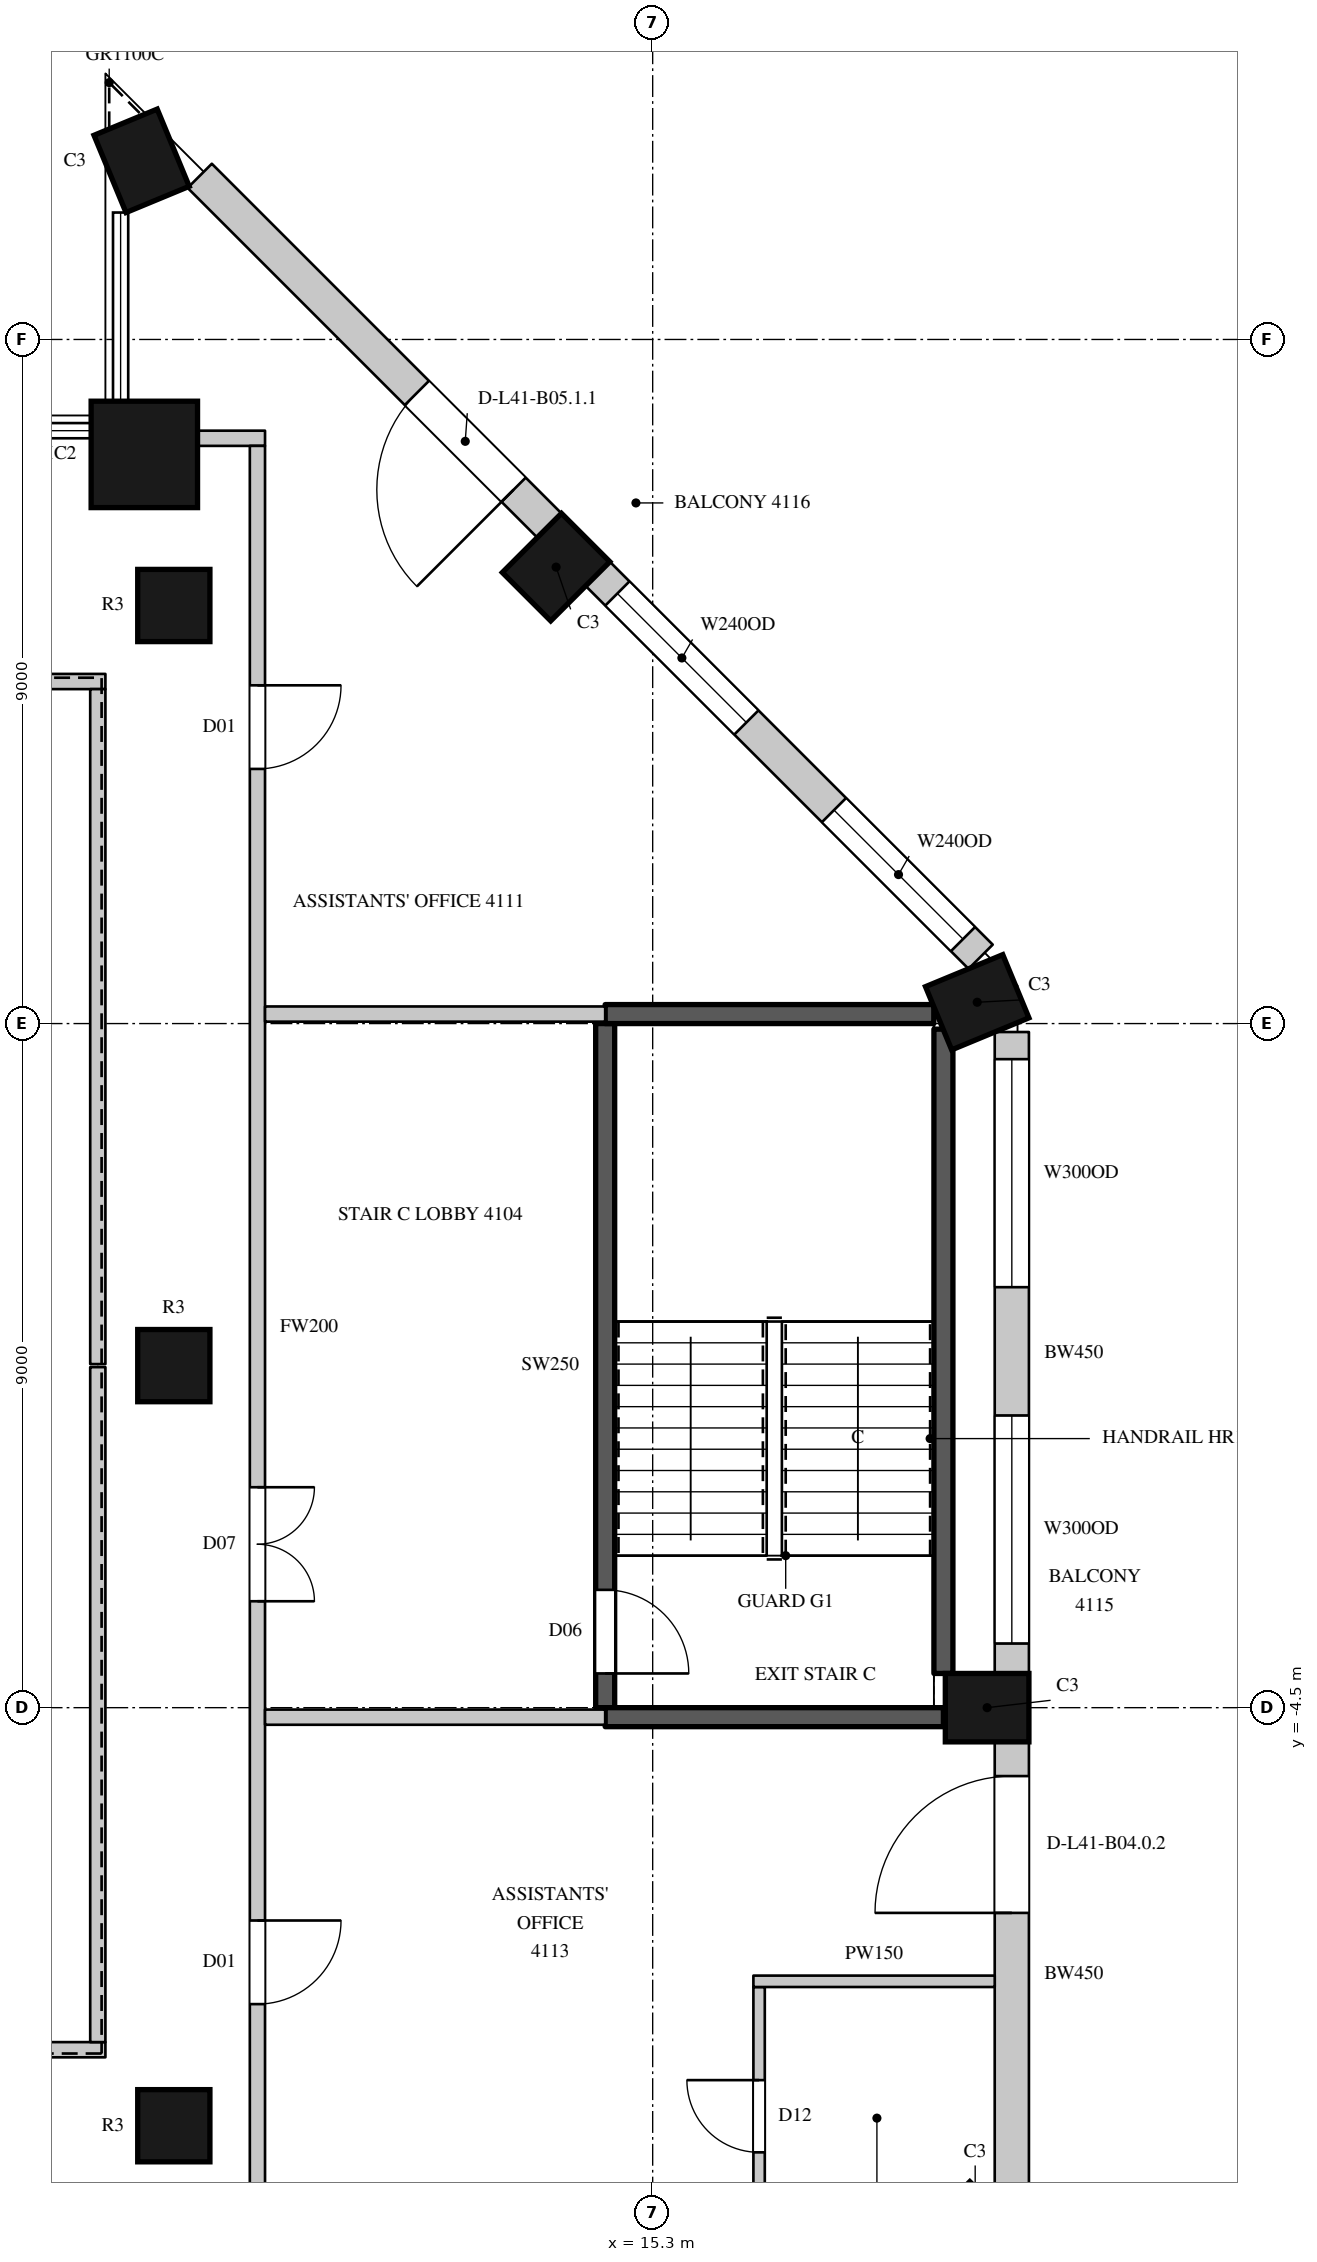
"""IFC4 building model, lengths in metres.
Left out: names, types, materials, properties, quantities, classifications, styles, units other than length and angle.
Written with IfcOpenShell. Run it as: python <this file> out.ifc"""

import sys

from ifc_helpers import new_model, si_unit, direction, frame, frame_2d, origin, origin_2d, place, context, subcontext, project, spatial, rectangle, circle, extrude, element, fill, save


model = new_model("IFC4")
c1 = context("Model", 3, precision=1e-05, world=origin(), true_north=direction((0.0, 1.0)))
c2 = subcontext(c1, "Body", "Model", "MODEL_VIEW")
j1 = project(units=[si_unit("LENGTHUNIT", "METRE"), si_unit("PLANEANGLEUNIT", "RADIAN")], contexts=[c1])
p1 = place(None, origin())
s1 = spatial("IfcSite", under=j1, at=p1, CompositionType="ELEMENT")
p2 = place(p1, origin())
s2 = spatial("IfcBuilding", under=s1, at=p2, CompositionType="ELEMENT")
p3 = place(p2, frame((0.0, 0.0, 189.2)))
s3 = spatial("IfcBuildingStorey", under=s2, at=p3, CompositionType="ELEMENT", Elevation=189.2)
for number, where, z_axis, x_axis in (
    (1, (19.543, -11.443, 0.0), (0.0, 0.0, 1.0), (0.707, 0.707, 0.0)),
    (2, (19.7, -4.5, 0.0), (0.0, 0.0, 1.0), (0.0, 1.0, 0.0)),
    (3, (19.57, 4.78, 0.0), (0.0, 0.0, 1.0), (-0.383, 0.924, 0.0)),
    (4, (14.029, 10.505, 0.0), (0.0, 0.0, 1.0), (-0.707, 0.707, 0.0)),
    (5, (8.576, 15.85, 0.0), (0.0, 0.0, 1.0), (-0.924, -0.383, 0.0)),
):
    element("IfcColumn", number, at=place(p3, frame(where, z_axis=z_axis, x_axis=x_axis)), inside=s3, PredefinedType="COLUMN", context=c2, shape_type="SweptSolid", body=[
        extrude(rectangle(XDim=0.9, YDim=1.1, at=origin_2d()), origin(), (0.0, 0.0, 1.0), 4.1),
    ])
p4 = place(p3, frame((8.612, 11.988, 0.0), z_axis=(0.0, 0.0, 1.0), x_axis=(1.0, 0.0, 0.0)))
e6 = element("IfcColumn", 6, at=p4, inside=s3, PredefinedType="COLUMN", context=c2, shape_type="SweptSolid", body=[
    extrude(circle(Radius=0.7, at=origin_2d()), origin(), (0.0, 0.0, 1.0), 4.1),
])
for number, where, z_axis, x_axis in (
    (7, (9.0, -10.0, 0.0), (0.0, 0.0, 1.0), (1.0, 0.0, 0.0)),
    (8, (9.0, 0.0, 0.0), (0.0, 0.0, 1.0), (1.0, 0.0, 0.0)),
    (9, (9.0, 10.0, 0.0), (0.0, 0.0, 1.0), (1.0, 0.0, 0.0)),
):
    element("IfcColumn", number, at=place(p3, frame(where, z_axis=z_axis, x_axis=x_axis)), inside=s3, PredefinedType="COLUMN", context=c2, shape_type="SweptSolid", body=[
        extrude(circle(Radius=0.475, at=origin_2d()), origin(), (0.0, 0.0, 1.0), 4.1),
    ])
p5 = place(p3, frame((20.025, -11.064, 0.0), z_axis=(0.0, 0.0, 1.0), x_axis=(0.0, 1.0, 0.0)))
e10 = element("IfcWall", 10, at=p5, inside=s3, PredefinedType="SOLIDWALL", context=c2, shape_type="SweptSolid", body=[
    extrude(rectangle(XDim=6.114, YDim=0.45, at=frame_2d((3.057, 0.0))), origin(), (0.0, 0.0, 1.0), 3.8),
])
p6 = place(p5, frame((3.864, 0.0, 0.0)))
e11 = element("IfcOpeningElement", 11, at=p6, cuts=e10, PredefinedType="OPENING", context=c2, shape_type="SweptSolid", body=[
    extrude(rectangle(XDim=1.8, YDim=2.4, at=frame_2d((0.9, 1.2))), frame((0.0, 0.235, 0.0), z_axis=(0.0, -1.0, 0.0), x_axis=(1.0, 0.0, 0.0)), (0.0, 0.0, 1.0), 0.47),
])
p7 = place(p3, frame((20.025, -4.05, 0.0), z_axis=(0.0, 0.0, 1.0), x_axis=(0.0, 1.0, 0.0)))
e12 = element("IfcWall", 12, at=p7, inside=s3, PredefinedType="SOLIDWALL", context=c2, shape_type="SweptSolid", body=[
    extrude(rectangle(XDim=8.439, YDim=0.45, at=frame_2d((4.219, 0.0))), origin(), (0.0, 0.0, 1.0), 3.8),
])
p8 = place(p7, frame((0.394, 0.0, 1.05)))
e13 = element("IfcOpeningElement", 13, at=p8, cuts=e12, PredefinedType="OPENING", context=c2, shape_type="SweptSolid", body=[
    extrude(rectangle(XDim=3.0, YDim=2.4, at=frame_2d((1.5, 1.2))), frame((0.0, 0.235, 0.0), z_axis=(0.0, -1.0, 0.0), x_axis=(1.0, 0.0, 0.0)), (0.0, 0.0, 1.0), 0.47),
])
p9 = place(p7, frame((5.082, 0.0, 1.05)))
e14 = element("IfcOpeningElement", 14, at=p9, cuts=e12, PredefinedType="OPENING", context=c2, shape_type="SweptSolid", body=[
    extrude(rectangle(XDim=3.0, YDim=2.4, at=frame_2d((1.5, 1.2))), frame((0.0, 0.235, 0.0), z_axis=(0.0, -1.0, 0.0), x_axis=(1.0, 0.0, 0.0)), (0.0, 0.0, 1.0), 0.47),
])
p10 = place(p3, frame((19.615, 5.379, 0.0), z_axis=(0.0, 0.0, 1.0), x_axis=(-0.707089646058, 0.7071239159, 0.0)))
e15 = element("IfcWall", 15, at=p10, inside=s3, PredefinedType="SOLIDWALL", context=c2, shape_type="SweptSolid", body=[
    extrude(rectangle(XDim=7.124, YDim=0.45, at=frame_2d((3.562, 0.0))), origin(), (0.0, 0.0, 1.0), 3.8),
])
p11 = place(p10, frame((0.328, 0.0, 1.05)))
e16 = element("IfcOpeningElement", 16, at=p11, cuts=e15, PredefinedType="OPENING", context=c2, shape_type="SweptSolid", body=[
    extrude(rectangle(XDim=2.4, YDim=2.4, at=frame_2d((1.2, 1.2))), frame((0.0, 0.235, 0.0), z_axis=(0.0, -1.0, 0.0), x_axis=(1.0, 0.0, 0.0)), (0.0, 0.0, 1.0), 0.47),
])
p12 = place(p10, frame((4.359, 0.0, 1.05)))
e17 = element("IfcOpeningElement", 17, at=p12, cuts=e15, PredefinedType="OPENING", context=c2, shape_type="SweptSolid", body=[
    extrude(rectangle(XDim=2.4, YDim=2.4, at=frame_2d((1.2, 1.2))), frame((0.0, 0.235, 0.0), z_axis=(0.0, -1.0, 0.0), x_axis=(1.0, 0.0, 0.0)), (0.0, 0.0, 1.0), 0.47),
])
p13 = place(p3, frame((13.941, 11.053, 0.0), z_axis=(0.0, 0.0, 1.0), x_axis=(-0.707106781187, 0.707106781187, 0.0)))
e18 = element("IfcWall", 18, at=p13, inside=s3, PredefinedType="SOLIDWALL", context=c2, shape_type="SweptSolid", body=[
    extrude(rectangle(XDim=6.505, YDim=0.45, at=frame_2d((3.252, 0.0))), origin(), (0.0, 0.0, 1.0), 3.8),
])
p14 = place(p13, frame((0.665, 0.0, 0.0)))
e19 = element("IfcOpeningElement", 19, at=p14, cuts=e18, PredefinedType="OPENING", context=c2, shape_type="SweptSolid", body=[
    extrude(rectangle(XDim=1.8, YDim=2.4, at=frame_2d((0.9, 1.2))), frame((0.0, 0.235, 0.0), z_axis=(0.0, -1.0, 0.0), x_axis=(1.0, 0.0, 0.0)), (0.0, 0.0, 1.0), 0.47),
])
for number, where, z_axis, x_axis in (
    (20, (-6.1, -9.0, 0.0), (0.0, 0.0, 1.0), (1.0, 0.0, 0.0)),
    (21, (-6.1, 9.0, 0.0), (0.0, 0.0, 1.0), (1.0, 0.0, 0.0)),
):
    element("IfcWall", number, at=place(p3, frame(where, z_axis=z_axis, x_axis=x_axis)), inside=s3, PredefinedType="PARTITIONING", context=c2, shape_type="SweptSolid", body=[
        extrude(rectangle(XDim=14.2, YDim=0.2, at=frame_2d((7.1, 0.0))), origin(), (0.0, 0.0, 1.0), 3.8),
    ])
for number, where, z_axis, x_axis in (
    (22, (8.0, -8.9, 0.0), (0.0, 0.0, 1.0), (0.0, 1.0, 0.0)),
    (23, (8.0, 0.02, 0.0), (0.0, 0.0, 1.0), (0.0, 1.0, 0.0)),
):
    element("IfcWall", number, at=place(p3, frame(where, z_axis=z_axis, x_axis=x_axis)), inside=s3, PredefinedType="PARTITIONING", context=c2, shape_type="SweptSolid", body=[
        extrude(rectangle(XDim=8.88, YDim=0.2, at=frame_2d((4.44, 0.0))), origin(), (0.0, 0.0, 1.0), 3.8),
    ])
p15 = place(p3, frame((9.296, 12.2, 0.0), z_axis=(0.0, 0.0, 1.0), x_axis=(1.0, 0.0, 0.0)))
e24 = element("IfcWall", 24, at=p15, inside=s3, PredefinedType="PARTITIONING", context=c2, shape_type="SweptSolid", body=[
    extrude(rectangle(XDim=0.904, YDim=0.2, at=frame_2d((0.452, 0.0))), origin(), (0.0, 0.0, 1.0), 3.8),
])
p16 = place(p3, frame((10.1, -11.1, 0.0), z_axis=(0.0, 0.0, 1.0), x_axis=(0.0, 1.0, 0.0)))
e25 = element("IfcWall", 25, at=p16, inside=s3, PredefinedType="PARTITIONING", context=c2, shape_type="SweptSolid", body=[
    extrude(rectangle(XDim=23.2, YDim=0.2, at=frame_2d((11.6, 0.0))), origin(), (0.0, 0.0, 1.0), 3.8),
])
p17 = place(p16, frame((8.0, 0.0, 0.0)))
e26 = element("IfcOpeningElement", 26, at=p17, cuts=e25, PredefinedType="OPENING", context=c2, shape_type="SweptSolid", body=[
    extrude(rectangle(XDim=1.5, YDim=2.4, at=frame_2d((0.75, 1.2))), frame((0.0, 0.11, 0.0), z_axis=(0.0, -1.0, 0.0), x_axis=(1.0, 0.0, 0.0)), (0.0, 0.0, 1.0), 0.22),
])
p18 = place(p16, frame((18.95, 0.0, 0.0)))
e27 = element("IfcOpeningElement", 27, at=p18, cuts=e25, PredefinedType="OPENING", context=c2, shape_type="SweptSolid", body=[
    extrude(rectangle(XDim=1.1, YDim=2.4, at=frame_2d((0.55, 1.2))), frame((0.0, 0.11, 0.0), z_axis=(0.0, -1.0, 0.0), x_axis=(1.0, 0.0, 0.0)), (0.0, 0.0, 1.0), 0.22),
])
p19 = place(p16, frame((2.7, 0.0, 0.0)))
e28 = element("IfcOpeningElement", 28, at=p19, cuts=e25, PredefinedType="OPENING", context=c2, shape_type="SweptSolid", body=[
    extrude(rectangle(XDim=1.1, YDim=2.4, at=frame_2d((0.55, 1.2))), frame((0.0, 0.11, 0.0), z_axis=(0.0, -1.0, 0.0), x_axis=(1.0, 0.0, 0.0)), (0.0, 0.0, 1.0), 0.22),
])
for number, where, z_axis, x_axis in (
    (29, (10.2, -4.625, 0.0), (0.0, 0.0, 1.0), (1.0, 0.0, 0.0)),
    (30, (10.2, 4.625, 0.0), (0.0, 0.0, 1.0), (1.0, 0.0, 0.0)),
):
    element("IfcWall", number, at=place(p3, frame(where, z_axis=z_axis, x_axis=x_axis)), inside=s3, PredefinedType="PARTITIONING", context=c2, shape_type="SweptSolid", body=[
        extrude(rectangle(XDim=4.475, YDim=0.2, at=frame_2d((2.238, 0.0))), origin(), (0.0, 0.0, 1.0), 3.8),
    ])
p20 = place(p3, frame((16.7, -11.7, 0.0), z_axis=(0.0, 0.0, 1.0), x_axis=(0.0, 1.0, 0.0)))
e31 = element("IfcWall", 31, at=p20, inside=s3, PredefinedType="PARTITIONING", context=c2, shape_type="SweptSolid", body=[
    extrude(rectangle(XDim=3.525, YDim=0.15, at=frame_2d((1.762, 0.0))), origin(), (0.0, 0.0, 1.0), 3.8),
])
p21 = place(p20, frame((1.35, 0.0, 0.0)))
e32 = element("IfcOpeningElement", 32, at=p21, cuts=e31, PredefinedType="OPENING", context=c2, shape_type="SweptSolid", body=[
    extrude(rectangle(XDim=0.95, YDim=2.2, at=frame_2d((0.475, 1.1))), frame((0.0, 0.085, 0.0), z_axis=(0.0, -1.0, 0.0), x_axis=(1.0, 0.0, 0.0)), (0.0, 0.0, 1.0), 0.17),
])
p22 = place(p3, frame((16.625, -8.1, 0.0), z_axis=(0.0, 0.0, 1.0), x_axis=(1.0, 0.0, 0.0)))
e33 = element("IfcWall", 33, at=p22, inside=s3, PredefinedType="PARTITIONING", context=c2, shape_type="SweptSolid", body=[
    extrude(rectangle(XDim=3.175, YDim=0.15, at=frame_2d((1.587, 0.0))), origin(), (0.0, 0.0, 1.0), 3.15),
])
p23 = place(p3, frame((14.675, -4.5, 0.0), z_axis=(0.0, 0.0, 1.0), x_axis=(0.0, 1.0, 0.0)))
e34 = element("IfcWall", 34, at=p23, inside=s3, PredefinedType="SHEAR", context=c2, shape_type="SweptSolid", body=[
    extrude(rectangle(XDim=9.0, YDim=0.25, at=frame_2d((4.5, 0.0))), origin(), (0.0, 0.0, 1.0), 3.8),
])
p24 = place(p23, frame((0.45, 0.0, 0.0)))
e35 = element("IfcOpeningElement", 35, at=p24, cuts=e34, PredefinedType="OPENING", context=c2, shape_type="SweptSolid", body=[
    extrude(rectangle(XDim=1.1, YDim=2.2, at=frame_2d((0.55, 1.1))), frame((0.0, 0.135, 0.0), z_axis=(0.0, -1.0, 0.0), x_axis=(1.0, 0.0, 0.0)), (0.0, 0.0, 1.0), 0.27),
])
p25 = place(p3, frame((14.675, -4.625, 0.0), z_axis=(0.0, 0.0, 1.0), x_axis=(1.0, 0.0, 0.0)))
e36 = element("IfcWall", 36, at=p25, inside=s3, PredefinedType="SHEAR", context=c2, shape_type="SweptSolid", body=[
    extrude(rectangle(XDim=4.45, YDim=0.25, at=frame_2d((2.225, 0.0))), origin(), (0.0, 0.0, 1.0), 3.8),
])
p26 = place(p3, frame((14.675, 4.625, 0.0), z_axis=(0.0, 0.0, 1.0), x_axis=(1.0, 0.0, 0.0)))
e37 = element("IfcWall", 37, at=p26, inside=s3, PredefinedType="SHEAR", context=c2, shape_type="SweptSolid", body=[
    extrude(rectangle(XDim=4.324, YDim=0.25, at=frame_2d((2.162, 0.0))), origin(), (0.0, 0.0, 1.0), 3.8),
])
p27 = place(p3, frame((19.125, -4.05, 0.0), z_axis=(0.0, 0.0, 1.0), x_axis=(0.0, 1.0, 0.0)))
e38 = element("IfcWall", 38, at=p27, inside=s3, PredefinedType="SHEAR", context=c2, shape_type="SweptSolid", body=[
    extrude(rectangle(XDim=8.477, YDim=0.25, at=frame_2d((4.238, 0.0))), origin(), (0.0, 0.0, 1.0), 3.8),
])
p28 = place(p6, origin())
e39 = element("IfcDoor", 39, at=p28, inside=s3, OperationType="SLIDING_TO_LEFT", PredefinedType="DOOR", context=c2, shape_type="SweptSolid", body=[
    extrude(rectangle(XDim=1.8, YDim=2.4, at=frame_2d((0.9, 1.2))), frame((0.0, 0.13, 0.0), z_axis=(0.0, -1.0, 0.0), x_axis=(1.0, 0.0, 0.0)), (0.0, 0.0, 1.0), 0.05),
])
fill(e11, e39)
p29 = place(p8, origin())
e40 = element("IfcWindow", 40, at=p29, inside=s3, PartitioningType="SINGLE_PANEL", PredefinedType="WINDOW", context=c2, shape_type="SweptSolid", body=[
    extrude(rectangle(XDim=3.0, YDim=2.4, at=frame_2d((1.5, 1.2))), frame((0.0, 0.135, 0.0), z_axis=(0.0, -1.0, 0.0), x_axis=(1.0, 0.0, 0.0)), (0.0, 0.0, 1.0), 0.06),
])
fill(e13, e40)
p30 = place(p9, origin())
e41 = element("IfcWindow", 41, at=p30, inside=s3, PartitioningType="SINGLE_PANEL", PredefinedType="WINDOW", context=c2, shape_type="SweptSolid", body=[
    extrude(rectangle(XDim=3.0, YDim=2.4, at=frame_2d((1.5, 1.2))), frame((0.0, 0.135, 0.0), z_axis=(0.0, -1.0, 0.0), x_axis=(1.0, 0.0, 0.0)), (0.0, 0.0, 1.0), 0.06),
])
fill(e14, e41)
p31 = place(p11, origin())
e42 = element("IfcWindow", 42, at=p31, inside=s3, PartitioningType="SINGLE_PANEL", PredefinedType="WINDOW", context=c2, shape_type="SweptSolid", body=[
    extrude(rectangle(XDim=2.4, YDim=2.4, at=frame_2d((1.2, 1.2))), frame((0.0, 0.135, 0.0), z_axis=(0.0, -1.0, 0.0), x_axis=(1.0, 0.0, 0.0)), (0.0, 0.0, 1.0), 0.06),
])
fill(e16, e42)
p32 = place(p12, origin())
e43 = element("IfcWindow", 43, at=p32, inside=s3, PartitioningType="SINGLE_PANEL", PredefinedType="WINDOW", context=c2, shape_type="SweptSolid", body=[
    extrude(rectangle(XDim=2.4, YDim=2.4, at=frame_2d((1.2, 1.2))), frame((0.0, 0.135, 0.0), z_axis=(0.0, -1.0, 0.0), x_axis=(1.0, 0.0, 0.0)), (0.0, 0.0, 1.0), 0.06),
])
fill(e17, e43)
p33 = place(p14, origin())
e44 = element("IfcDoor", 44, at=p33, inside=s3, OperationType="SLIDING_TO_LEFT", PredefinedType="DOOR", context=c2, shape_type="SweptSolid", body=[
    extrude(rectangle(XDim=1.8, YDim=2.4, at=frame_2d((0.9, 1.2))), frame((0.0, 0.13, 0.0), z_axis=(0.0, -1.0, 0.0), x_axis=(1.0, 0.0, 0.0)), (0.0, 0.0, 1.0), 0.05),
])
fill(e19, e44)
p34 = place(p17, origin())
e45 = element("IfcDoor", 45, at=p34, inside=s3, OperationType="DOUBLE_DOOR_SINGLE_SWING", PredefinedType="DOOR", context=c2, shape_type="SweptSolid", body=[
    extrude(rectangle(XDim=1.5, YDim=2.4, at=frame_2d((0.75, 1.2))), frame((0.0, 0.025, 0.0), z_axis=(0.0, -1.0, 0.0), x_axis=(1.0, 0.0, 0.0)), (0.0, 0.0, 1.0), 0.05),
])
fill(e26, e45)
p35 = place(p18, origin())
e46 = element("IfcDoor", 46, at=p35, inside=s3, OperationType="SINGLE_SWING_LEFT", PredefinedType="DOOR", context=c2, shape_type="SweptSolid", body=[
    extrude(rectangle(XDim=1.1, YDim=2.4, at=frame_2d((0.55, 1.2))), frame((0.0, 0.025, 0.0), z_axis=(0.0, -1.0, 0.0), x_axis=(1.0, 0.0, 0.0)), (0.0, 0.0, 1.0), 0.05),
])
fill(e27, e46)
p36 = place(p19, origin())
e47 = element("IfcDoor", 47, at=p36, inside=s3, OperationType="SINGLE_SWING_LEFT", PredefinedType="DOOR", context=c2, shape_type="SweptSolid", body=[
    extrude(rectangle(XDim=1.1, YDim=2.4, at=frame_2d((0.55, 1.2))), frame((0.0, 0.025, 0.0), z_axis=(0.0, -1.0, 0.0), x_axis=(1.0, 0.0, 0.0)), (0.0, 0.0, 1.0), 0.05),
])
fill(e28, e47)
p37 = place(p21, origin())
e48 = element("IfcDoor", 48, at=p37, inside=s3, OperationType="SINGLE_SWING_RIGHT", PredefinedType="DOOR", context=c2, shape_type="SweptSolid", body=[
    extrude(rectangle(XDim=0.95, YDim=2.2, at=frame_2d((0.475, 1.1))), frame((0.0, 0.025, 0.0), z_axis=(0.0, -1.0, 0.0), x_axis=(1.0, 0.0, 0.0)), (0.0, 0.0, 1.0), 0.05),
])
fill(e32, e48)
p38 = place(p24, origin())
e49 = element("IfcDoor", 49, at=p38, inside=s3, OperationType="SINGLE_SWING_RIGHT", PredefinedType="DOOR", context=c2, shape_type="SweptSolid", body=[
    extrude(rectangle(XDim=1.1, YDim=2.2, at=frame_2d((0.55, 1.1))), frame((0.0, 0.025, 0.0), z_axis=(0.0, -1.0, 0.0), x_axis=(1.0, 0.0, 0.0)), (0.0, 0.0, 1.0), 0.05),
])
fill(e35, e49)
save(model, sys.argv[1])
